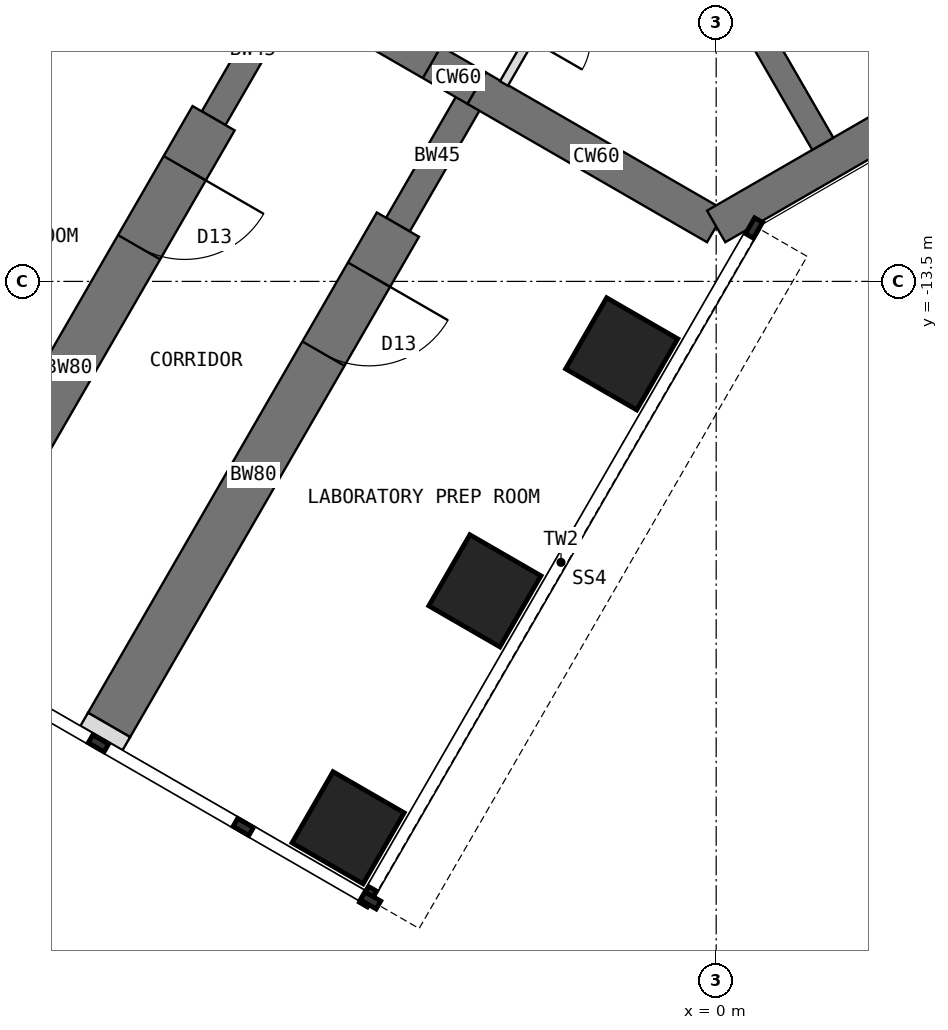
"""IFC4 building model, lengths in metres.
Left out: names, types, materials, properties, quantities, classifications, styles, units other than length and angle.
Written with IfcOpenShell. Run it as: python <this file> out.ifc"""

import sys

from ifc_helpers import new_model, si_unit, direction, frame, frame_2d, origin, origin_2d, place, context, subcontext, project, spatial, rectangle, extrude, element, fill, save


model = new_model("IFC4")
c1 = context("Model", 3, precision=1e-05, world=origin(), true_north=direction((0.0, 1.0)))
c2 = subcontext(c1, "Body", "Model", "MODEL_VIEW")
j1 = project(units=[si_unit("LENGTHUNIT", "METRE"), si_unit("PLANEANGLEUNIT", "RADIAN")], contexts=[c1])
p1 = place(None, origin())
s1 = spatial("IfcSite", under=j1, at=p1, CompositionType="ELEMENT")
p2 = place(p1, origin())
s2 = spatial("IfcBuilding", under=s1, at=p2, CompositionType="ELEMENT")
p3 = place(p2, frame((0.0, 0.0, 113.5)))
s3 = spatial("IfcBuildingStorey", under=s2, at=p3, CompositionType="ELEMENT", Elevation=113.5)
p4 = place(p3, frame((-6.97, -8.572, 0.0), z_axis=(0.0, 0.0, 1.0), x_axis=(0.866019471182, -0.500010275428, 0.0)))
e1 = element("IfcWall", 1, at=p4, inside=s3, PredefinedType="SHEAR", context=c2, shape_type="SweptSolid", body=[
    extrude(rectangle(XDim=3.5, YDim=0.6, at=frame_2d((1.75, 0.0))), origin(), (0.0, 0.0, 1.0), 4.0),
])
p5 = place(p4, frame((0.85, 0.0, 0.0)))
e2 = element("IfcOpeningElement", 2, at=p5, cuts=e1, PredefinedType="OPENING", context=c2, shape_type="SweptSolid", body=[
    extrude(rectangle(XDim=1.8, YDim=2.1, at=frame_2d((0.9, 1.05))), frame((0.0, 0.31, 0.0), z_axis=(0.0, -1.0, 0.0), x_axis=(1.0, 0.0, 0.0)), (0.0, 0.0, 1.0), 0.62),
])
p6 = place(p3, frame((-3.939, -10.322, 0.0), z_axis=(0.0, 0.0, 1.0), x_axis=(0.866011268655, -0.500024481964, 0.0)))
e3 = element("IfcWall", 3, at=p6, inside=s3, PredefinedType="SHEAR", context=c2, shape_type="SweptSolid", body=[
    extrude(rectangle(XDim=4.548, YDim=0.6, at=frame_2d((2.274, 0.0))), origin(), (0.0, 0.0, 1.0), 4.0),
])
p7 = place(p3, frame((0.0, -12.596, 0.0), z_axis=(0.0, 0.0, 1.0), x_axis=(0.866021940709, 0.500005998175, 0.0)))
e4 = element("IfcWall", 4, at=p7, inside=s3, PredefinedType="SHEAR", context=c2, shape_type="SweptSolid", body=[
    extrude(rectangle(XDim=12.596, YDim=0.6, at=frame_2d((6.298, 0.0))), origin(), (0.0, 0.0, 1.0), 4.0),
])
p8 = place(p3, frame((-3.939, -10.322, 0.0), z_axis=(0.0, 0.0, 1.0), x_axis=(-0.499918158782, -0.866072649678, 0.0)))
e5 = element("IfcWall", 5, at=p8, inside=s3, PredefinedType="SHEAR", context=c2, shape_type="SweptSolid", body=[
    extrude(rectangle(XDim=2.592, YDim=0.45, at=frame_2d((1.296, 0.0))), origin(), (0.0, 0.0, 1.0), 4.0),
])
p9 = place(p3, frame((-5.234, -12.566, 0.0), z_axis=(0.0, 0.0, 1.0), x_axis=(-0.499997557548, -0.86602681393, 0.0)))
e6 = element("IfcWall", 6, at=p9, inside=s3, PredefinedType="SHEAR", context=c2, shape_type="SweptSolid", body=[
    extrude(rectangle(XDim=9.5, YDim=0.8, at=frame_2d((4.75, 0.0))), origin(), (0.0, 0.0, 1.0), 4.0),
])
p10 = place(p9, frame((0.95, 0.0, 0.0)))
e7 = element("IfcOpeningElement", 7, at=p10, cuts=e6, PredefinedType="OPENING", context=c2, shape_type="SweptSolid", body=[
    extrude(rectangle(XDim=1.5, YDim=2.1, at=frame_2d((0.75, 1.05))), frame((0.0, 0.41, 0.0), z_axis=(0.0, -1.0, 0.0), x_axis=(1.0, 0.0, 0.0)), (0.0, 0.0, 1.0), 0.82),
])
p11 = place(p3, frame((-6.97, -8.572, 0.0), z_axis=(0.0, 0.0, 1.0), x_axis=(-0.499988811324, -0.866031863473, 0.0)))
e8 = element("IfcWall", 8, at=p11, inside=s3, PredefinedType="SHEAR", context=c2, shape_type="SweptSolid", body=[
    extrude(rectangle(XDim=2.592, YDim=0.45, at=frame_2d((1.296, 0.0))), origin(), (0.0, 0.0, 1.0), 4.0),
])
p12 = place(p3, frame((-8.266, -10.816, 0.0), z_axis=(0.0, 0.0, 1.0), x_axis=(-0.499997557548, -0.86602681393, 0.0)))
e9 = element("IfcWall", 9, at=p12, inside=s3, PredefinedType="SHEAR", context=c2, shape_type="SweptSolid", body=[
    extrude(rectangle(XDim=9.5, YDim=0.8, at=frame_2d((4.75, 0.0))), origin(), (0.0, 0.0, 1.0), 4.0),
])
p13 = place(p12, frame((0.95, 0.0, 0.0)))
e10 = element("IfcOpeningElement", 10, at=p13, cuts=e9, PredefinedType="OPENING", context=c2, shape_type="SweptSolid", body=[
    extrude(rectangle(XDim=1.5, YDim=2.1, at=frame_2d((0.75, 1.05))), frame((0.0, 0.41, 0.0), z_axis=(0.0, -1.0, 0.0), x_axis=(1.0, 0.0, 0.0)), (0.0, 0.0, 1.0), 0.82),
])
for number, where, z_axis, x_axis in (
    (11, (-1.554, -14.691, 0.0), (0.0, 0.0, 1.0), (0.5, 0.866, 0.0)),
    (12, (-3.804, -18.588, 0.0), (0.0, 0.0, 1.0), (0.5, 0.866, 0.0)),
    (13, (-6.054, -22.486, 0.0), (0.0, 0.0, 1.0), (0.5, 0.866, 0.0)),
):
    element("IfcColumn", number, at=place(p3, frame(where, z_axis=z_axis, x_axis=x_axis)), inside=s3, PredefinedType="COLUMN", context=c2, shape_type="SweptSolid", body=[
        extrude(rectangle(XDim=1.35, YDim=1.35, at=origin_2d()), origin(), (0.0, 0.0, 1.0), 4.0),
    ])
p14 = place(p3, frame((-9.984, -20.794, 0.0), z_axis=(0.0, 0.0, 1.0), x_axis=(-0.500342721131, -0.865827443207, 0.0)))
e14 = element("IfcWall", 14, at=p14, inside=s3, PredefinedType="PARTITIONING", context=c2, shape_type="SweptSolid", body=[
    extrude(rectangle(XDim=0.25, YDim=0.8, at=frame_2d((0.125, 0.0))), origin(), (0.0, 0.0, 1.0), 3.8),
])
p15 = place(p3, frame((-1.201, -6.12, 0.0), z_axis=(0.0, 0.0, 1.0), x_axis=(0.49999668571, -0.866027317282, 0.0)))
e15 = element("IfcWall", 15, at=p15, inside=s3, PredefinedType="SHEAR", context=c2, shape_type="SweptSolid", body=[
    extrude(rectangle(XDim=5.908, YDim=0.4, at=frame_2d((2.954, 0.0))), origin(), (0.0, 0.0, 1.0), 4.0),
])
p16 = place(p3, frame((-1.253, -6.37, 0.0), z_axis=(0.0, 0.0, 1.0), x_axis=(-0.499999473313, -0.866025707867, 0.0)))
e16 = element("IfcWall", 16, at=p16, inside=s3, PredefinedType="PARTITIONING", context=c2, shape_type="SweptSolid", body=[
    extrude(rectangle(XDim=4.476, YDim=0.15, at=frame_2d((2.238, 0.0))), origin(), (0.0, 0.0, 1.0), 3.8),
])
p17 = place(p16, frame((2.633, 0.0, 0.0)))
e17 = element("IfcOpeningElement", 17, at=p17, cuts=e16, PredefinedType="OPENING", context=c2, shape_type="SweptSolid", body=[
    extrude(rectangle(XDim=1.0, YDim=2.1, at=frame_2d((0.5, 1.05))), frame((0.0, 0.085, 0.0), z_axis=(0.0, -1.0, 0.0), x_axis=(1.0, 0.0, 0.0)), (0.0, 0.0, 1.0), 0.17),
])
p18 = place(p5, origin())
e18 = element("IfcDoor", 18, at=p18, inside=s3, OperationType="DOUBLE_DOOR_DOUBLE_SWING", PredefinedType="DOOR", context=c2, shape_type="SweptSolid", body=[
    extrude(rectangle(XDim=1.72, YDim=2.06, at=frame_2d((0.9, 1.03))), frame((0.0, 0.025, 0.0), z_axis=(0.0, -1.0, 0.0), x_axis=(1.0, 0.0, 0.0)), (0.0, 0.0, 1.0), 0.05),
    extrude(rectangle(XDim=0.04, YDim=2.1, at=frame_2d((0.02, 1.05))), frame((0.0, 0.3, 0.0), z_axis=(0.0, -1.0, 0.0), x_axis=(1.0, 0.0, 0.0)), (0.0, 0.0, 1.0), 0.6),
    extrude(rectangle(XDim=0.04, YDim=2.1, at=frame_2d((1.78, 1.05))), frame((0.0, 0.3, 0.0), z_axis=(0.0, -1.0, 0.0), x_axis=(1.0, 0.0, 0.0)), (0.0, 0.0, 1.0), 0.6),
    extrude(rectangle(XDim=1.72, YDim=0.04, at=frame_2d((0.9, 2.08))), frame((0.0, 0.3, 0.0), z_axis=(0.0, -1.0, 0.0), x_axis=(1.0, 0.0, 0.0)), (0.0, 0.0, 1.0), 0.6),
])
fill(e2, e18)
p19 = place(p10, origin())
e19 = element("IfcDoor", 19, at=p19, inside=s3, OperationType="DOUBLE_DOOR_SINGLE_SWING", PredefinedType="DOOR", context=c2, shape_type="SweptSolid", body=[
    extrude(rectangle(XDim=1.42, YDim=2.06, at=frame_2d((0.75, 1.03))), frame((0.0, 0.025, 0.0), z_axis=(0.0, -1.0, 0.0), x_axis=(1.0, 0.0, 0.0)), (0.0, 0.0, 1.0), 0.05),
    extrude(rectangle(XDim=0.04, YDim=2.1, at=frame_2d((0.02, 1.05))), frame((0.0, 0.4, 0.0), z_axis=(0.0, -1.0, 0.0), x_axis=(1.0, 0.0, 0.0)), (0.0, 0.0, 1.0), 0.8),
    extrude(rectangle(XDim=0.04, YDim=2.1, at=frame_2d((1.48, 1.05))), frame((0.0, 0.4, 0.0), z_axis=(0.0, -1.0, 0.0), x_axis=(1.0, 0.0, 0.0)), (0.0, 0.0, 1.0), 0.8),
    extrude(rectangle(XDim=1.42, YDim=0.04, at=frame_2d((0.75, 2.08))), frame((0.0, 0.4, 0.0), z_axis=(0.0, -1.0, 0.0), x_axis=(1.0, 0.0, 0.0)), (0.0, 0.0, 1.0), 0.8),
])
fill(e7, e19)
p20 = place(p13, origin())
e20 = element("IfcDoor", 20, at=p20, inside=s3, OperationType="DOUBLE_DOOR_SINGLE_SWING", PredefinedType="DOOR", context=c2, shape_type="SweptSolid", body=[
    extrude(rectangle(XDim=1.42, YDim=2.06, at=frame_2d((0.75, 1.03))), frame((0.0, 0.025, 0.0), z_axis=(0.0, -1.0, 0.0), x_axis=(1.0, 0.0, 0.0)), (0.0, 0.0, 1.0), 0.05),
    extrude(rectangle(XDim=0.04, YDim=2.1, at=frame_2d((0.02, 1.05))), frame((0.0, 0.4, 0.0), z_axis=(0.0, -1.0, 0.0), x_axis=(1.0, 0.0, 0.0)), (0.0, 0.0, 1.0), 0.8),
    extrude(rectangle(XDim=0.04, YDim=2.1, at=frame_2d((1.48, 1.05))), frame((0.0, 0.4, 0.0), z_axis=(0.0, -1.0, 0.0), x_axis=(1.0, 0.0, 0.0)), (0.0, 0.0, 1.0), 0.8),
    extrude(rectangle(XDim=1.42, YDim=0.04, at=frame_2d((0.75, 2.08))), frame((0.0, 0.4, 0.0), z_axis=(0.0, -1.0, 0.0), x_axis=(1.0, 0.0, 0.0)), (0.0, 0.0, 1.0), 0.8),
])
fill(e10, e20)
save(model, sys.argv[1])
